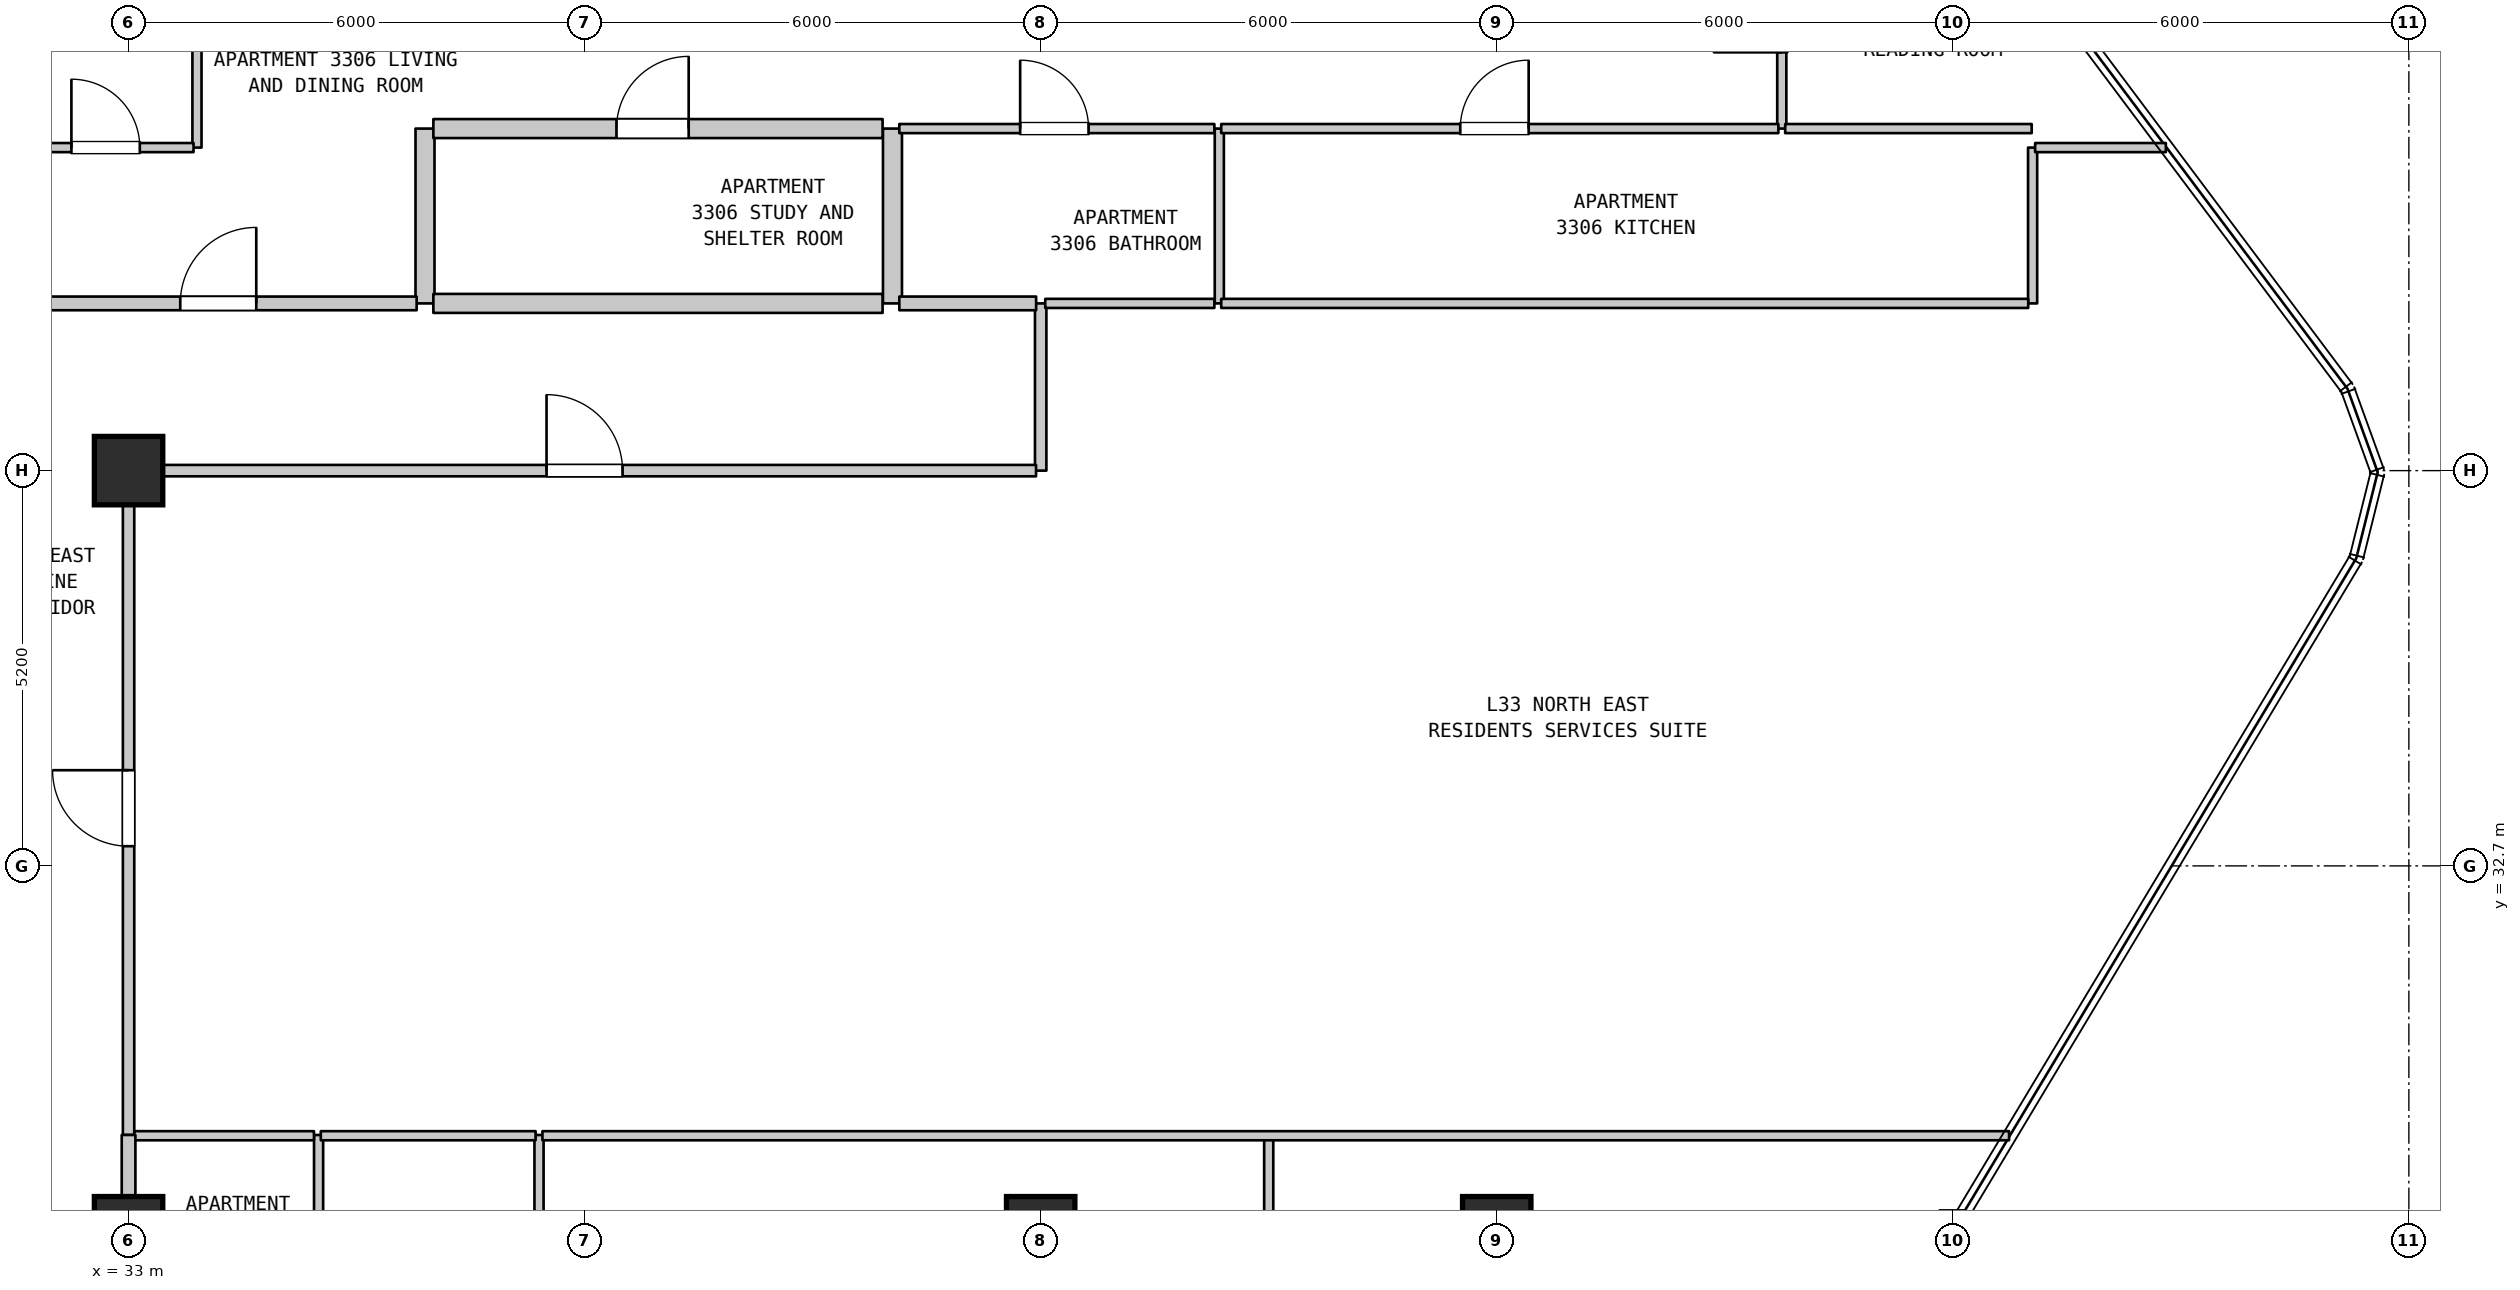
"""IFC4 building model, lengths in metres.
Left out: names, types, materials, properties, quantities, classifications, styles, units other than length and angle.
Written with IfcOpenShell. Run it as: python <this file> out.ifc"""

import sys

from ifc_helpers import new_model, si_unit, direction, frame, frame_2d, origin, origin_2d, place, context, subcontext, project, spatial, rectangle, extrude, element, fill, save


model = new_model("IFC4")
c1 = context("Model", 3, precision=1e-05, world=origin(), true_north=direction((0.0, 1.0)))
c2 = subcontext(c1, "Body", "Model", "MODEL_VIEW")
j1 = project(units=[si_unit("LENGTHUNIT", "METRE"), si_unit("PLANEANGLEUNIT", "RADIAN")], contexts=[c1])
p1 = place(None, origin())
s1 = spatial("IfcSite", under=j1, at=p1, CompositionType="ELEMENT")
p2 = place(p1, origin())
s2 = spatial("IfcBuilding", under=s1, at=p2, CompositionType="ELEMENT")
p3 = place(p2, frame((0.0, 0.0, 137.2)))
s3 = spatial("IfcBuildingStorey", under=s2, at=p3, CompositionType="ELEMENT", Elevation=137.2)
for number, where, z_axis, x_axis in (
    (1, (33.0, 27.9, 0.0), (0.0, 0.0, 1.0), (1.0, 0.0, 0.0)),
    (2, (33.0, 37.9, 0.0), (0.0, 0.0, 1.0), (1.0, 0.0, 0.0)),
    (3, (45.0, 27.9, 0.0), (0.0, 0.0, 1.0), (1.0, 0.0, 0.0)),
    (4, (51.0, 27.9, 0.0), (0.0, 0.0, 1.0), (1.0, 0.0, 0.0)),
):
    element("IfcColumn", number, at=place(p3, frame(where, z_axis=z_axis, x_axis=x_axis)), inside=s3, PredefinedType="COLUMN", context=c2, shape_type="SweptSolid", body=[
        extrude(rectangle(XDim=0.9, YDim=0.9, at=origin_2d()), origin(), (0.0, 0.0, 1.0), 3.7),
    ])
p4 = place(p3, frame((33.0, 29.16, 0.0), z_axis=(0.0, 0.0, 1.0), x_axis=(0.0, 1.0, 0.0)))
e5 = element("IfcWall", 5, at=p4, inside=s3, PredefinedType="STANDARD", context=c2, shape_type="SweptSolid", body=[
    extrude(rectangle(XDim=8.74, YDim=0.15, at=frame_2d((4.37, 0.0))), origin(), (0.0, 0.0, 1.0), 2.885),
])
p5 = place(p4, frame((3.799, 0.0, 0.0)))
e6 = element("IfcOpeningElement", 6, at=p5, cuts=e5, PredefinedType="OPENING", context=c2, shape_type="SweptSolid", body=[
    extrude(rectangle(XDim=1.0, YDim=2.15, at=frame_2d((0.5, 1.075))), frame((0.0, 0.085, 0.0), z_axis=(0.0, -1.0, 0.0), x_axis=(1.0, 0.0, 0.0)), (0.0, 0.0, 1.0), 0.17),
])
p6 = place(p3, frame((33.9, 42.15, 0.0), z_axis=(0.0, 0.0, 1.0), x_axis=(0.0, 1.0, 0.0)))
e7 = element("IfcWall", 7, at=p6, inside=s3, PredefinedType="PARTITIONING", context=c2, shape_type="SweptSolid", body=[
    extrude(rectangle(XDim=3.15, YDim=0.12, at=frame_2d((1.575, 0.0))), origin(), (0.0, 0.0, 1.0), 3.385),
])
p7 = place(p3, frame((35.5, 25.78, 0.0), z_axis=(0.0, 0.0, 1.0), x_axis=(0.0, 1.0, 0.0)))
e8 = element("IfcWall", 8, at=p7, inside=s3, PredefinedType="PARTITIONING", context=c2, shape_type="SweptSolid", body=[
    extrude(rectangle(XDim=3.38, YDim=0.12, at=frame_2d((1.69, 0.0))), origin(), (0.0, 0.0, 1.0), 3.385),
])
p8 = place(p3, frame((36.9, 40.1, 0.0), z_axis=(0.0, 0.0, 1.0), x_axis=(0.0, 1.0, 0.0)))
e9 = element("IfcWall", 9, at=p8, inside=s3, PredefinedType="STANDARD", context=c2, shape_type="SweptSolid", body=[
    extrude(rectangle(XDim=2.3, YDim=0.25, at=frame_2d((1.15, 0.0))), origin(), (0.0, 0.0, 1.0), 3.385),
])
p9 = place(p3, frame((38.4, 25.78, 0.0), z_axis=(0.0, 0.0, 1.0), x_axis=(0.0, 1.0, 0.0)))
e10 = element("IfcWall", 10, at=p9, inside=s3, PredefinedType="PARTITIONING", context=c2, shape_type="SweptSolid", body=[
    extrude(rectangle(XDim=3.38, YDim=0.12, at=frame_2d((1.69, 0.0))), origin(), (0.0, 0.0, 1.0), 3.385),
])
p10 = place(p3, frame((43.05, 40.1, 0.0), z_axis=(0.0, 0.0, 1.0), x_axis=(0.0, 1.0, 0.0)))
e11 = element("IfcWall", 11, at=p10, inside=s3, PredefinedType="STANDARD", context=c2, shape_type="SweptSolid", body=[
    extrude(rectangle(XDim=2.3, YDim=0.25, at=frame_2d((1.15, 0.0))), origin(), (0.0, 0.0, 1.0), 3.385),
])
p11 = place(p3, frame((45.0, 37.9, 0.0), z_axis=(0.0, 0.0, 1.0), x_axis=(0.0, 1.0, 0.0)))
e12 = element("IfcWall", 12, at=p11, inside=s3, PredefinedType="STANDARD", context=c2, shape_type="SweptSolid", body=[
    extrude(rectangle(XDim=2.2, YDim=0.15, at=frame_2d((1.1, 0.0))), origin(), (0.0, 0.0, 1.0), 3.385),
])
p12 = place(p3, frame((47.35, 40.1, 0.0), z_axis=(0.0, 0.0, 1.0), x_axis=(0.0, 1.0, 0.0)))
e13 = element("IfcWall", 13, at=p12, inside=s3, PredefinedType="PARTITIONING", context=c2, shape_type="SweptSolid", body=[
    extrude(rectangle(XDim=2.3, YDim=0.12, at=frame_2d((1.15, 0.0))), origin(), (0.0, 0.0, 1.0), 3.385),
])
p13 = place(p3, frame((48.0, 25.78, 0.0), z_axis=(0.0, 0.0, 1.0), x_axis=(0.0, 1.0, 0.0)))
e14 = element("IfcWall", 14, at=p13, inside=s3, PredefinedType="PARTITIONING", context=c2, shape_type="SweptSolid", body=[
    extrude(rectangle(XDim=3.38, YDim=0.12, at=frame_2d((1.69, 0.0))), origin(), (0.0, 0.0, 1.0), 3.385),
])
p14 = place(p3, frame((54.75, 42.4, 0.0), z_axis=(0.0, 0.0, 1.0), x_axis=(0.0, 1.0, 0.0)))
e15 = element("IfcWall", 15, at=p14, inside=s3, PredefinedType="PARTITIONING", context=c2, shape_type="SweptSolid", body=[
    extrude(rectangle(XDim=3.05, YDim=0.12, at=frame_2d((1.525, 0.0))), origin(), (0.0, 0.0, 1.0), 3.385),
])
p15 = place(p14, frame((1.003, 0.0, 0.0)))
e16 = element("IfcOpeningElement", 16, at=p15, cuts=e15, PredefinedType="OPENING", context=c2, shape_type="SweptSolid", body=[
    extrude(rectangle(XDim=0.9, YDim=2.15, at=frame_2d((0.45, 1.075))), frame((0.0, 0.07, 0.0), z_axis=(0.0, -1.0, 0.0), x_axis=(1.0, 0.0, 0.0)), (0.0, 0.0, 1.0), 0.14),
])
p16 = place(p3, frame((58.05, 40.1, 0.0), z_axis=(0.0, 0.0, 1.0), x_axis=(0.0, 1.0, 0.0)))
e17 = element("IfcWall", 17, at=p16, inside=s3, PredefinedType="PARTITIONING", context=c2, shape_type="SweptSolid", body=[
    extrude(rectangle(XDim=2.05, YDim=0.12, at=frame_2d((1.025, 0.0))), origin(), (0.0, 0.0, 1.0), 3.385),
])
p17 = place(p3, frame((33.075, 29.15, 0.0), z_axis=(0.0, 0.0, 1.0), x_axis=(1.0, 0.0, 0.0)))
e18 = element("IfcWall", 18, at=p17, inside=s3, PredefinedType="PARTITIONING", context=c2, shape_type="SweptSolid", body=[
    extrude(rectangle(XDim=2.364, YDim=0.12, at=frame_2d((1.182, 0.0))), origin(), (0.0, 0.0, 1.0), 3.385),
])
p18 = place(p3, frame((35.529, 29.15, 0.0), z_axis=(0.0, 0.0, 1.0), x_axis=(1.0, 0.0, 0.0)))
e19 = element("IfcWall", 19, at=p18, inside=s3, PredefinedType="PARTITIONING", context=c2, shape_type="SweptSolid", body=[
    extrude(rectangle(XDim=2.826, YDim=0.12, at=frame_2d((1.413, 0.0))), origin(), (0.0, 0.0, 1.0), 3.385),
])
p19 = place(p3, frame((38.445, 29.15, 0.0), z_axis=(0.0, 0.0, 1.0), x_axis=(1.0, 0.0, 0.0)))
e20 = element("IfcWall", 20, at=p19, inside=s3, PredefinedType="PARTITIONING", context=c2, shape_type="SweptSolid", body=[
    extrude(rectangle(XDim=19.295, YDim=0.12, at=frame_2d((9.647, 0.0))), origin(), (0.0, 0.0, 1.0), 3.385),
])
p20 = place(p3, frame((33.06, 37.9, 0.0), z_axis=(0.0, 0.0, 1.0), x_axis=(1.0, 0.0, 0.0)))
e21 = element("IfcWall", 21, at=p20, inside=s3, PredefinedType="STANDARD", context=c2, shape_type="SweptSolid", body=[
    extrude(rectangle(XDim=11.879, YDim=0.15, at=frame_2d((5.939, 0.0))), origin(), (0.0, 0.0, 1.0), 3.385),
])
p21 = place(p20, frame((5.439, 0.0, 0.0)))
e22 = element("IfcOpeningElement", 22, at=p21, cuts=e21, PredefinedType="OPENING", context=c2, shape_type="SweptSolid", body=[
    extrude(rectangle(XDim=1.0, YDim=2.15, at=frame_2d((0.5, 1.075))), frame((0.0, 0.085, 0.0), z_axis=(0.0, -1.0, 0.0), x_axis=(1.0, 0.0, 0.0)), (0.0, 0.0, 1.0), 0.17),
])
p22 = place(p3, frame((31.245, 40.1, 0.0), z_axis=(0.0, 0.0, 1.0), x_axis=(1.0, 0.0, 0.0)))
e23 = element("IfcWall", 23, at=p22, inside=s3, PredefinedType="STANDARD", context=c2, shape_type="SweptSolid", body=[
    extrude(rectangle(XDim=5.545, YDim=0.18, at=frame_2d((2.772, 0.0))), origin(), (0.0, 0.0, 1.0), 3.385),
])
p23 = place(p22, frame((2.435, 0.0, 0.0)))
e24 = element("IfcOpeningElement", 24, at=p23, cuts=e23, PredefinedType="OPENING", context=c2, shape_type="SweptSolid", body=[
    extrude(rectangle(XDim=1.0, YDim=2.15, at=frame_2d((0.5, 1.075))), frame((0.0, 0.1, 0.0), z_axis=(0.0, -1.0, 0.0), x_axis=(1.0, 0.0, 0.0)), (0.0, 0.0, 1.0), 0.2),
])
p24 = place(p3, frame((37.01, 40.1, 0.0), z_axis=(0.0, 0.0, 1.0), x_axis=(1.0, 0.0, 0.0)))
e25 = element("IfcWall", 25, at=p24, inside=s3, PredefinedType="STANDARD", context=c2, shape_type="SweptSolid", body=[
    extrude(rectangle(XDim=5.91, YDim=0.25, at=frame_2d((2.955, 0.0))), origin(), (0.0, 0.0, 1.0), 3.385),
])
p25 = place(p3, frame((43.14, 40.1, 0.0), z_axis=(0.0, 0.0, 1.0), x_axis=(1.0, 0.0, 0.0)))
e26 = element("IfcWall", 26, at=p25, inside=s3, PredefinedType="STANDARD", context=c2, shape_type="SweptSolid", body=[
    extrude(rectangle(XDim=1.8, YDim=0.18, at=frame_2d((0.9, 0.0))), origin(), (0.0, 0.0, 1.0), 3.385),
])
p26 = place(p3, frame((45.06, 40.1, 0.0), z_axis=(0.0, 0.0, 1.0), x_axis=(1.0, 0.0, 0.0)))
e27 = element("IfcWall", 27, at=p26, inside=s3, PredefinedType="PARTITIONING", context=c2, shape_type="SweptSolid", body=[
    extrude(rectangle(XDim=2.225, YDim=0.12, at=frame_2d((1.112, 0.0))), origin(), (0.0, 0.0, 1.0), 3.385),
])
p27 = place(p3, frame((47.375, 40.1, 0.0), z_axis=(0.0, 0.0, 1.0), x_axis=(1.0, 0.0, 0.0)))
e28 = element("IfcWall", 28, at=p27, inside=s3, PredefinedType="PARTITIONING", context=c2, shape_type="SweptSolid", body=[
    extrude(rectangle(XDim=10.617, YDim=0.12, at=frame_2d((5.309, 0.0))), origin(), (0.0, 0.0, 1.0), 3.385),
])
p28 = place(p3, frame((31.695, 42.15, 0.0), z_axis=(0.0, 0.0, 1.0), x_axis=(1.0, 0.0, 0.0)))
e29 = element("IfcWall", 29, at=p28, inside=s3, PredefinedType="PARTITIONING", context=c2, shape_type="SweptSolid", body=[
    extrude(rectangle(XDim=2.16, YDim=0.12, at=frame_2d((1.08, 0.0))), origin(), (0.0, 0.0, 1.0), 3.385),
])
p29 = place(p28, frame((0.553, 0.0, 0.0)))
e30 = element("IfcOpeningElement", 30, at=p29, cuts=e29, PredefinedType="OPENING", context=c2, shape_type="SweptSolid", body=[
    extrude(rectangle(XDim=0.9, YDim=2.15, at=frame_2d((0.45, 1.075))), frame((0.0, 0.07, 0.0), z_axis=(0.0, -1.0, 0.0), x_axis=(1.0, 0.0, 0.0)), (0.0, 0.0, 1.0), 0.14),
])
p30 = place(p3, frame((58.083, 42.15, 0.0), z_axis=(0.0, 0.0, 1.0), x_axis=(1.0, 0.0, 0.0)))
e31 = element("IfcWall", 31, at=p30, inside=s3, PredefinedType="PARTITIONING", context=c2, shape_type="SweptSolid", body=[
    extrude(rectangle(XDim=1.72, YDim=0.12, at=frame_2d((0.86, 0.0))), origin(), (0.0, 0.0, 1.0), 3.385),
])
p31 = place(p3, frame((37.01, 42.4, 0.0), z_axis=(0.0, 0.0, 1.0), x_axis=(1.0, 0.0, 0.0)))
e32 = element("IfcWall", 32, at=p31, inside=s3, PredefinedType="STANDARD", context=c2, shape_type="SweptSolid", body=[
    extrude(rectangle(XDim=5.91, YDim=0.25, at=frame_2d((2.955, 0.0))), origin(), (0.0, 0.0, 1.0), 3.385),
])
p32 = place(p31, frame((2.409, 0.0, 0.0)))
e33 = element("IfcOpeningElement", 33, at=p32, cuts=e32, PredefinedType="OPENING", context=c2, shape_type="SweptSolid", body=[
    extrude(rectangle(XDim=0.95, YDim=2.15, at=frame_2d((0.475, 1.075))), frame((0.0, 0.135, 0.0), z_axis=(0.0, -1.0, 0.0), x_axis=(1.0, 0.0, 0.0)), (0.0, 0.0, 1.0), 0.27),
])
p33 = place(p3, frame((43.14, 42.4, 0.0), z_axis=(0.0, 0.0, 1.0), x_axis=(1.0, 0.0, 0.0)))
e34 = element("IfcWall", 34, at=p33, inside=s3, PredefinedType="PARTITIONING", context=c2, shape_type="SweptSolid", body=[
    extrude(rectangle(XDim=4.145, YDim=0.12, at=frame_2d((2.073, 0.0))), origin(), (0.0, 0.0, 1.0), 3.385),
])
p34 = place(p33, frame((1.59, 0.0, 0.0)))
e35 = element("IfcOpeningElement", 35, at=p34, cuts=e34, PredefinedType="OPENING", context=c2, shape_type="SweptSolid", body=[
    extrude(rectangle(XDim=0.9, YDim=2.1, at=frame_2d((0.45, 1.05))), frame((0.0, 0.07, 0.0), z_axis=(0.0, -1.0, 0.0), x_axis=(1.0, 0.0, 0.0)), (0.0, 0.0, 1.0), 0.14),
])
p35 = place(p3, frame((47.375, 42.4, 0.0), z_axis=(0.0, 0.0, 1.0), x_axis=(1.0, 0.0, 0.0)))
e36 = element("IfcWall", 36, at=p35, inside=s3, PredefinedType="PARTITIONING", context=c2, shape_type="SweptSolid", body=[
    extrude(rectangle(XDim=7.33, YDim=0.12, at=frame_2d((3.665, 0.0))), origin(), (0.0, 0.0, 1.0), 3.385),
])
p36 = place(p35, frame((3.145, 0.0, 0.0)))
e37 = element("IfcOpeningElement", 37, at=p36, cuts=e36, PredefinedType="OPENING", context=c2, shape_type="SweptSolid", body=[
    extrude(rectangle(XDim=0.9, YDim=2.15, at=frame_2d((0.45, 1.075))), frame((0.0, 0.07, 0.0), z_axis=(0.0, -1.0, 0.0), x_axis=(1.0, 0.0, 0.0)), (0.0, 0.0, 1.0), 0.14),
])
p37 = place(p3, frame((54.795, 42.4, 0.0), z_axis=(0.0, 0.0, 1.0), x_axis=(1.0, 0.0, 0.0)))
e38 = element("IfcWall", 38, at=p37, inside=s3, PredefinedType="PARTITIONING", context=c2, shape_type="SweptSolid", body=[
    extrude(rectangle(XDim=3.243, YDim=0.12, at=frame_2d((1.622, 0.0))), origin(), (0.0, 0.0, 1.0), 3.385),
])
p38 = place(p3, frame((33.0, 27.9, 0.0), z_axis=(0.0, 0.0, 1.0), x_axis=(0.0, 1.0, 0.0)))
e39 = element("IfcWall", 39, at=p38, inside=s3, PredefinedType="STANDARD", context=c2, shape_type="SweptSolid", body=[
    extrude(rectangle(XDim=1.26, YDim=0.18, at=frame_2d((0.63, 0.0))), origin(), (0.0, 0.0, 1.0), 2.885),
])
p39 = place(p5, origin())
e40 = element("IfcDoor", 40, at=p39, inside=s3, OperationType="SINGLE_SWING_RIGHT", PredefinedType="DOOR", context=c2, shape_type="SweptSolid", body=[
    extrude(rectangle(XDim=1.0, YDim=2.15, at=frame_2d((0.5, 1.075))), frame((0.0, 0.025, 0.0), z_axis=(0.0, -1.0, 0.0), x_axis=(1.0, 0.0, 0.0)), (0.0, 0.0, 1.0), 0.05),
])
fill(e6, e40)
p40 = place(p21, origin())
e41 = element("IfcDoor", 41, at=p40, inside=s3, OperationType="SINGLE_SWING_LEFT", PredefinedType="DOOR", context=c2, shape_type="SweptSolid", body=[
    extrude(rectangle(XDim=1.0, YDim=2.15, at=frame_2d((0.5, 1.075))), frame((0.0, 0.025, 0.0), z_axis=(0.0, -1.0, 0.0), x_axis=(1.0, 0.0, 0.0)), (0.0, 0.0, 1.0), 0.05),
])
fill(e22, e41)
p41 = place(p23, origin())
e42 = element("IfcDoor", 42, at=p41, inside=s3, OperationType="SINGLE_SWING_RIGHT", PredefinedType="DOOR", context=c2, shape_type="SweptSolid", body=[
    extrude(rectangle(XDim=1.0, YDim=2.15, at=frame_2d((0.5, 1.075))), frame((0.0, 0.025, 0.0), z_axis=(0.0, -1.0, 0.0), x_axis=(1.0, 0.0, 0.0)), (0.0, 0.0, 1.0), 0.05),
])
fill(e24, e42)
p42 = place(p29, origin())
e43 = element("IfcDoor", 43, at=p42, inside=s3, OperationType="SINGLE_SWING_LEFT", PredefinedType="DOOR", context=c2, shape_type="SweptSolid", body=[
    extrude(rectangle(XDim=0.9, YDim=2.15, at=frame_2d((0.45, 1.075))), frame((0.0, 0.025, 0.0), z_axis=(0.0, -1.0, 0.0), x_axis=(1.0, 0.0, 0.0)), (0.0, 0.0, 1.0), 0.05),
])
fill(e30, e43)
p43 = place(p32, origin())
e44 = element("IfcDoor", 44, at=p43, inside=s3, OperationType="SINGLE_SWING_RIGHT", PredefinedType="DOOR", context=c2, shape_type="SweptSolid", body=[
    extrude(rectangle(XDim=0.95, YDim=2.15, at=frame_2d((0.475, 1.075))), frame((0.0, 0.025, 0.0), z_axis=(0.0, -1.0, 0.0), x_axis=(1.0, 0.0, 0.0)), (0.0, 0.0, 1.0), 0.05),
])
fill(e33, e44)
p44 = place(p34, origin())
e45 = element("IfcDoor", 45, at=p44, inside=s3, OperationType="SINGLE_SWING_LEFT", PredefinedType="DOOR", context=c2, shape_type="SweptSolid", body=[
    extrude(rectangle(XDim=0.9, YDim=2.1, at=frame_2d((0.45, 1.05))), frame((0.0, 0.025, 0.0), z_axis=(0.0, -1.0, 0.0), x_axis=(1.0, 0.0, 0.0)), (0.0, 0.0, 1.0), 0.05),
])
fill(e35, e45)
p45 = place(p36, origin())
e46 = element("IfcDoor", 46, at=p45, inside=s3, OperationType="SINGLE_SWING_RIGHT", PredefinedType="DOOR", context=c2, shape_type="SweptSolid", body=[
    extrude(rectangle(XDim=0.9, YDim=2.15, at=frame_2d((0.45, 1.075))), frame((0.0, 0.025, 0.0), z_axis=(0.0, -1.0, 0.0), x_axis=(1.0, 0.0, 0.0)), (0.0, 0.0, 1.0), 0.05),
])
fill(e37, e46)
save(model, sys.argv[1])
